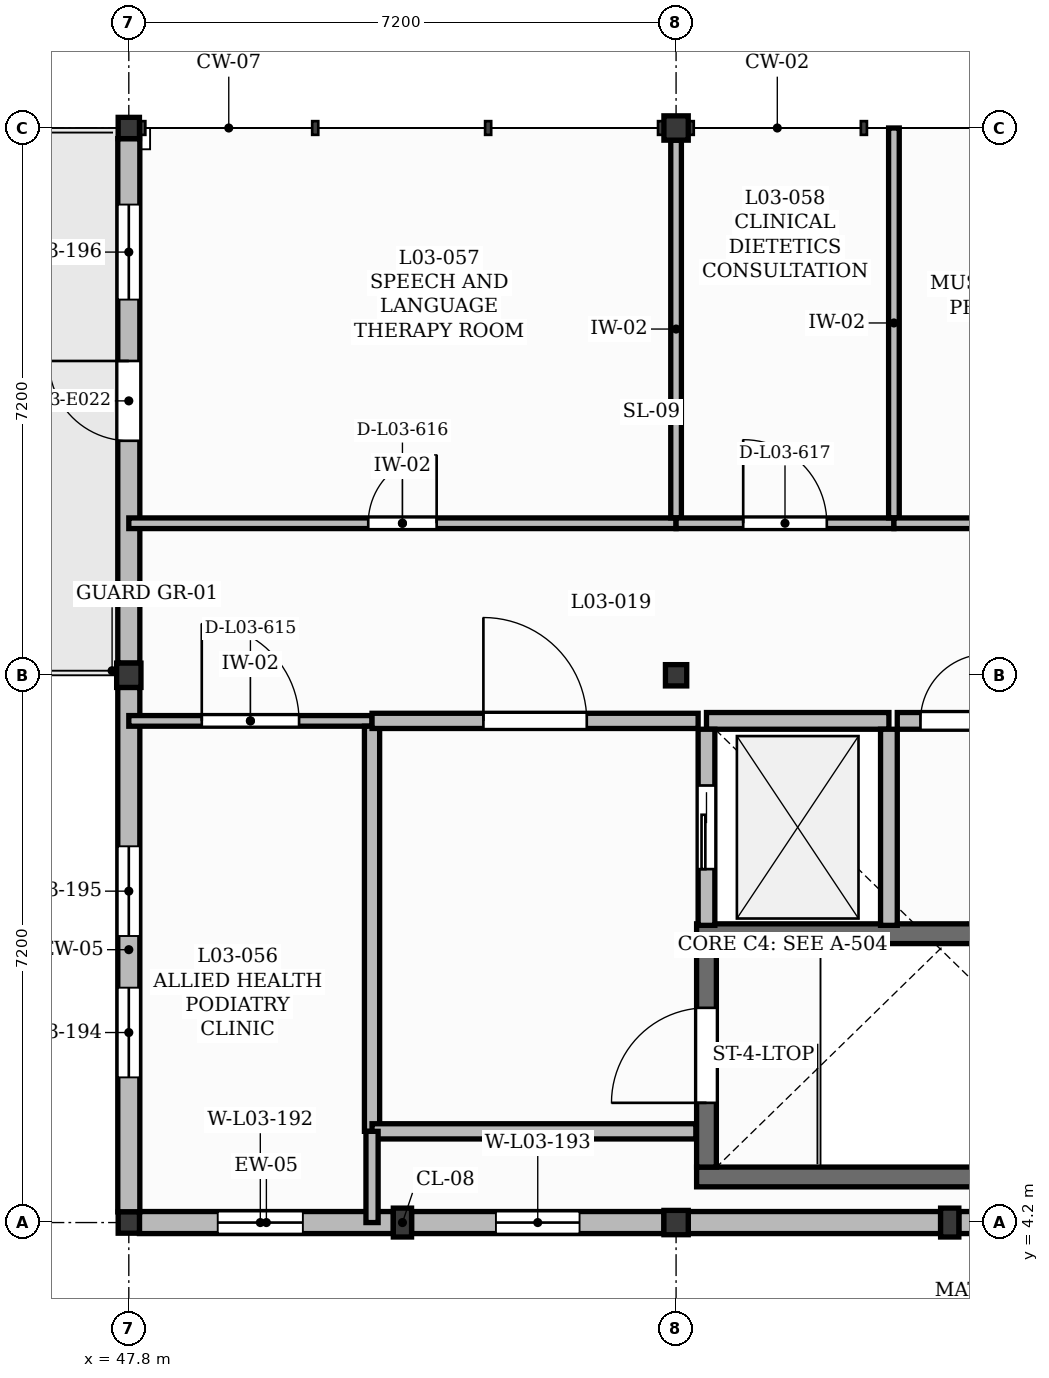
"""IFC4 building model, lengths in metres.
Left out: names, types, materials, properties, quantities, classifications, styles, units other than length and angle.
Written with IfcOpenShell. Run it as: python <this file> out.ifc"""

import sys

from ifc_helpers import new_model, si_unit, direction, frame, frame_2d, origin, origin_2d, place, context, subcontext, project, spatial, rectangle, extrude, element, fill, save


model = new_model("IFC4")
c1 = context("Model", 3, precision=1e-05, world=origin(), true_north=direction((0.0, 1.0)))
c2 = subcontext(c1, "Body", "Model", "MODEL_VIEW")
j1 = project(units=[si_unit("LENGTHUNIT", "METRE"), si_unit("PLANEANGLEUNIT", "RADIAN")], contexts=[c1])
p1 = place(None, origin())
s1 = spatial("IfcSite", under=j1, at=p1, CompositionType="ELEMENT")
p2 = place(p1, origin())
s2 = spatial("IfcBuilding", under=s1, at=p2, CompositionType="ELEMENT")
p3 = place(p2, frame((0.0, 0.0, 13.2)))
s3 = spatial("IfcBuildingStorey", under=s2, at=p3, CompositionType="ELEMENT", Elevation=13.2)
p4 = place(p3, frame((47.8, 4.2, 0.0), z_axis=(0.0, 0.0, 1.0), x_axis=(1.0, 0.0, 0.0)))
e1 = element("IfcColumn", 1, at=p4, inside=s3, PredefinedType="COLUMN", context=c2, shape_type="SweptSolid", body=[
    extrude(rectangle(XDim=0.28, YDim=0.28, at=origin_2d()), origin(), (0.0, 0.0, 1.0), 3.98),
])
p5 = place(p3, frame((47.8, 11.4, 0.0), z_axis=(0.0, 0.0, 1.0), x_axis=(1.0, 0.0, 0.0)))
e2 = element("IfcColumn", 2, at=p5, inside=s3, PredefinedType="COLUMN", context=c2, shape_type="SweptSolid", body=[
    extrude(rectangle(XDim=0.32, YDim=0.32, at=origin_2d()), origin(), (0.0, 0.0, 1.0), 6.045),
])
p6 = place(p3, frame((47.8, 18.6, 0.0), z_axis=(0.0, 0.0, 1.0), x_axis=(1.0, 0.0, 0.0)))
e3 = element("IfcColumn", 3, at=p6, inside=s3, PredefinedType="COLUMN", context=c2, shape_type="SweptSolid", body=[
    extrude(rectangle(XDim=0.28, YDim=0.28, at=origin_2d()), origin(), (0.0, 0.0, 1.0), 8.109),
])
p7 = place(p3, frame((55.0, 4.2, 0.0), z_axis=(0.0, 0.0, 1.0), x_axis=(1.0, 0.0, 0.0)))
e4 = element("IfcColumn", 4, at=p7, inside=s3, PredefinedType="COLUMN", context=c2, shape_type="SweptSolid", body=[
    extrude(rectangle(XDim=0.32, YDim=0.32, at=origin_2d()), origin(), (0.0, 0.0, 1.0), 3.98),
])
p8 = place(p3, frame((55.0, 11.4, 0.0), z_axis=(0.0, 0.0, 1.0), x_axis=(1.0, 0.0, 0.0)))
e5 = element("IfcColumn", 5, at=p8, inside=s3, PredefinedType="COLUMN", context=c2, shape_type="SweptSolid", body=[
    extrude(rectangle(XDim=0.28, YDim=0.28, at=origin_2d()), origin(), (0.0, 0.0, 1.0), 6.045),
])
p9 = place(p3, frame((55.0, 18.6, 0.0), z_axis=(0.0, 0.0, 1.0), x_axis=(1.0, 0.0, 0.0)))
e6 = element("IfcColumn", 6, at=p9, inside=s3, PredefinedType="COLUMN", context=c2, shape_type="SweptSolid", body=[
    extrude(rectangle(XDim=0.32, YDim=0.32, at=origin_2d()), origin(), (0.0, 0.0, 1.0), 8.109),
])
for number, where, z_axis, x_axis in (
    (7, (51.4, 4.2, 0.0), (0.0, 0.0, 1.0), (1.0, 0.0, 0.0)),
    (8, (58.6, 4.2, 0.0), (0.0, 0.0, 1.0), (1.0, 0.0, 0.0)),
):
    element("IfcColumn", number, at=place(p3, frame(where, z_axis=z_axis, x_axis=x_axis)), inside=s3, PredefinedType="PILASTER", context=c2, shape_type="SweptSolid", body=[
        extrude(rectangle(XDim=0.24, YDim=0.38, at=origin_2d()), origin(), (0.0, 0.0, 1.0), 4.0),
    ])
p10 = place(p3, frame((47.94, 4.2, 0.0), z_axis=(0.0, 0.0, 1.0), x_axis=(1.0, 0.0, 0.0)))
e9 = element("IfcWall", 9, at=p10, inside=s3, PredefinedType="SOLIDWALL", context=c2, shape_type="SweptSolid", body=[
    extrude(rectangle(XDim=3.34, YDim=0.29, at=frame_2d((1.67, 0.0))), origin(), (0.0, 0.0, 1.0), 4.0),
])
p11 = place(p10, frame((1.03, 0.0, 1.05)))
e10 = element("IfcOpeningElement", 10, at=p11, cuts=e9, PredefinedType="OPENING", context=c2, shape_type="SweptSolid", body=[
    extrude(rectangle(XDim=1.12, YDim=1.65, at=frame_2d((0.56, 0.825))), frame((0.0, 0.155, 0.0), z_axis=(0.0, -1.0, 0.0), x_axis=(1.0, 0.0, 0.0)), (0.0, 0.0, 1.0), 0.31),
])
p12 = place(p3, frame((51.52, 4.2, 0.0), z_axis=(0.0, 0.0, 1.0), x_axis=(1.0, 0.0, 0.0)))
e11 = element("IfcWall", 11, at=p12, inside=s3, PredefinedType="SOLIDWALL", context=c2, shape_type="SweptSolid", body=[
    extrude(rectangle(XDim=3.32, YDim=0.29, at=frame_2d((1.66, 0.0))), origin(), (0.0, 0.0, 1.0), 4.0),
])
p13 = place(p12, frame((1.11, 0.0, 1.0)))
e12 = element("IfcOpeningElement", 12, at=p13, cuts=e11, PredefinedType="OPENING", context=c2, shape_type="SweptSolid", body=[
    extrude(rectangle(XDim=1.1, YDim=2.2, at=frame_2d((0.55, 1.1))), frame((0.0, 0.155, 0.0), z_axis=(0.0, -1.0, 0.0), x_axis=(1.0, 0.0, 0.0)), (0.0, 0.0, 1.0), 0.31),
])
p14 = place(p3, frame((47.8, 4.34, 0.0), z_axis=(0.0, 0.0, 1.0), x_axis=(0.0, 1.0, 0.0)))
e13 = element("IfcWall", 13, at=p14, inside=s3, PredefinedType="SOLIDWALL", context=c2, shape_type="SweptSolid", body=[
    extrude(rectangle(XDim=6.9, YDim=0.29, at=frame_2d((3.45, 0.0))), origin(), (0.0, 0.0, 1.0), 4.0),
])
p15 = place(p14, frame((1.77, 0.0, 0.9)))
e14 = element("IfcOpeningElement", 14, at=p15, cuts=e13, PredefinedType="OPENING", context=c2, shape_type="SweptSolid", body=[
    extrude(rectangle(XDim=1.18, YDim=2.4, at=frame_2d((0.59, 1.2))), frame((0.0, 0.155, 0.0), z_axis=(0.0, -1.0, 0.0), x_axis=(1.0, 0.0, 0.0)), (0.0, 0.0, 1.0), 0.31),
])
p16 = place(p14, frame((3.63, 0.0, 0.9)))
e15 = element("IfcOpeningElement", 15, at=p16, cuts=e13, PredefinedType="OPENING", context=c2, shape_type="SweptSolid", body=[
    extrude(rectangle(XDim=1.18, YDim=2.4, at=frame_2d((0.59, 1.2))), frame((0.0, 0.155, 0.0), z_axis=(0.0, -1.0, 0.0), x_axis=(1.0, 0.0, 0.0)), (0.0, 0.0, 1.0), 0.31),
])
p17 = place(p3, frame((47.8, 11.56, 0.0), z_axis=(0.0, 0.0, 1.0), x_axis=(0.0, 1.0, 0.0)))
e16 = element("IfcWall", 16, at=p17, inside=s3, PredefinedType="SOLIDWALL", context=c2, shape_type="SweptSolid", body=[
    extrude(rectangle(XDim=6.9, YDim=0.29, at=frame_2d((3.45, 0.0))), origin(), (0.0, 0.0, 1.0), 4.0),
])
p18 = place(p17, frame((2.925, 0.0, 0.0)))
e17 = element("IfcOpeningElement", 17, at=p18, cuts=e16, PredefinedType="OPENING", context=c2, shape_type="SweptSolid", body=[
    extrude(rectangle(XDim=1.05, YDim=2.2, at=frame_2d((0.525, 1.1))), frame((0.0, 0.155, 0.0), z_axis=(0.0, -1.0, 0.0), x_axis=(1.0, 0.0, 0.0)), (0.0, 0.0, 1.0), 0.31),
])
p19 = place(p17, frame((4.782, 0.0, 1.35)))
e18 = element("IfcOpeningElement", 18, at=p19, cuts=e16, PredefinedType="OPENING", context=c2, shape_type="SweptSolid", body=[
    extrude(rectangle(XDim=1.25, YDim=1.4, at=frame_2d((0.625, 0.7))), frame((0.0, 0.155, 0.0), z_axis=(0.0, -1.0, 0.0), x_axis=(1.0, 0.0, 0.0)), (0.0, 0.0, 1.0), 0.31),
])
p20 = place(p3, frame((55.16, 4.2, 0.0), z_axis=(0.0, 0.0, 1.0), x_axis=(1.0, 0.0, 0.0)))
e19 = element("IfcWall", 19, at=p20, inside=s3, PredefinedType="SOLIDWALL", context=c2, shape_type="SweptSolid", body=[
    extrude(rectangle(XDim=3.32, YDim=0.29, at=frame_2d((1.66, 0.0))), origin(), (0.0, 0.0, 1.0), 4.0),
])
p21 = place(p3, frame((58.72, 4.2, 0.0), z_axis=(0.0, 0.0, 1.0), x_axis=(1.0, 0.0, 0.0)))
e20 = element("IfcWall", 20, at=p21, inside=s3, PredefinedType="SOLIDWALL", context=c2, shape_type="SweptSolid", body=[
    extrude(rectangle(XDim=3.34, YDim=0.29, at=frame_2d((1.67, 0.0))), origin(), (0.0, 0.0, 1.0), 4.0),
])
for number, where, z_axis, x_axis in (
    (21, (55.27, 4.8, 0.0), (0.0, 0.0, 1.0), (1.0, 0.0, 0.0)),
    (22, (55.27, 8.0, 0.0), (0.0, 0.0, 1.0), (1.0, 0.0, 0.0)),
):
    element("IfcWall", number, at=place(p3, frame(where, z_axis=z_axis, x_axis=x_axis)), inside=s3, PredefinedType="SHEAR", context=c2, shape_type="SweptSolid", body=[
        extrude(rectangle(XDim=6.66, YDim=0.26, at=frame_2d((3.33, 0.0))), origin(), (0.0, 0.0, 1.0), 3.95),
    ])
p22 = place(p3, frame((55.4, 4.93, 0.0), z_axis=(0.0, 0.0, 1.0), x_axis=(0.0, 1.0, 0.0)))
e23 = element("IfcWall", 23, at=p22, inside=s3, PredefinedType="SHEAR", context=c2, shape_type="SweptSolid", body=[
    extrude(rectangle(XDim=2.94, YDim=0.26, at=frame_2d((1.47, 0.0))), origin(), (0.0, 0.0, 1.0), 3.95),
])
p23 = place(p22, frame((0.845, 0.0, 0.0)))
e24 = element("IfcOpeningElement", 24, at=p23, cuts=e23, PredefinedType="OPENING", context=c2, shape_type="SweptSolid", body=[
    extrude(rectangle(XDim=1.25, YDim=2.15, at=frame_2d((0.625, 1.075))), frame((0.0, 0.14, 0.0), z_axis=(0.0, -1.0, 0.0), x_axis=(1.0, 0.0, 0.0)), (0.0, 0.0, 1.0), 0.28),
])
p24 = place(p3, frame((55.4, 10.8, 0.0), z_axis=(0.0, 0.0, 1.0), x_axis=(1.0, 0.0, 0.0)))
e25 = element("IfcWall", 25, at=p24, inside=s3, PredefinedType="SOLIDWALL", context=c2, shape_type="SweptSolid", body=[
    extrude(rectangle(XDim=2.4, YDim=0.22, at=frame_2d((1.2, 0.0))), origin(), (0.0, 0.0, 1.0), 3.95),
])
p25 = place(p3, frame((55.4, 8.11, 0.0), z_axis=(0.0, 0.0, 1.0), x_axis=(0.0, 1.0, 0.0)))
e26 = element("IfcWall", 26, at=p25, inside=s3, PredefinedType="SOLIDWALL", context=c2, shape_type="SweptSolid", body=[
    extrude(rectangle(XDim=2.58, YDim=0.22, at=frame_2d((1.29, 0.0))), origin(), (0.0, 0.0, 1.0), 3.95),
])
p26 = place(p25, frame((0.74, 0.0, 0.0)))
e27 = element("IfcOpeningElement", 27, at=p26, cuts=e26, PredefinedType="OPENING", context=c2, shape_type="SweptSolid", body=[
    extrude(rectangle(XDim=1.1, YDim=2.15, at=frame_2d((0.55, 1.075))), frame((0.0, 0.12, 0.0), z_axis=(0.0, -1.0, 0.0), x_axis=(1.0, 0.0, 0.0)), (0.0, 0.0, 1.0), 0.24),
])
p27 = place(p3, frame((57.8, 8.11, 0.0), z_axis=(0.0, 0.0, 1.0), x_axis=(0.0, 1.0, 0.0)))
e28 = element("IfcWall", 28, at=p27, inside=s3, PredefinedType="SOLIDWALL", context=c2, shape_type="SweptSolid", body=[
    extrude(rectangle(XDim=2.58, YDim=0.22, at=frame_2d((1.29, 0.0))), origin(), (0.0, 0.0, 1.0), 3.95),
])
p28 = place(p3, frame((47.8, 10.8, 0.0), z_axis=(0.0, 0.0, 1.0), x_axis=(1.0, 0.0, 0.0)))
e29 = element("IfcWall", 29, at=p28, inside=s3, PredefinedType="PARTITIONING", context=c2, shape_type="SweptSolid", body=[
    extrude(rectangle(XDim=3.2, YDim=0.14, at=frame_2d((1.6, 0.0))), origin(), (0.0, 0.0, 1.0), 3.75),
])
p29 = place(p28, frame((0.96, 0.0, 0.0)))
e30 = element("IfcOpeningElement", 30, at=p29, cuts=e29, PredefinedType="OPENING", context=c2, shape_type="SweptSolid", body=[
    extrude(rectangle(XDim=1.28, YDim=2.2, at=frame_2d((0.64, 1.1))), frame((0.0, 0.08, 0.0), z_axis=(0.0, -1.0, 0.0), x_axis=(1.0, 0.0, 0.0)), (0.0, 0.0, 1.0), 0.16),
])
p30 = place(p3, frame((47.8, 13.4, 0.0), z_axis=(0.0, 0.0, 1.0), x_axis=(1.0, 0.0, 0.0)))
e31 = element("IfcWall", 31, at=p30, inside=s3, PredefinedType="PARTITIONING", context=c2, shape_type="SweptSolid", body=[
    extrude(rectangle(XDim=7.2, YDim=0.14, at=frame_2d((3.6, 0.0))), origin(), (0.0, 0.0, 1.0), 3.75),
])
p31 = place(p30, frame((3.15, 0.0, 0.0)))
e32 = element("IfcOpeningElement", 32, at=p31, cuts=e31, PredefinedType="OPENING", context=c2, shape_type="SweptSolid", body=[
    extrude(rectangle(XDim=0.9, YDim=2.1, at=frame_2d((0.45, 1.05))), frame((0.0, 0.08, 0.0), z_axis=(0.0, -1.0, 0.0), x_axis=(1.0, 0.0, 0.0)), (0.0, 0.0, 1.0), 0.16),
])
p32 = place(p3, frame((51.0, 5.4, 0.0), z_axis=(0.0, 0.0, 1.0), x_axis=(0.0, 1.0, 0.0)))
e33 = element("IfcWall", 33, at=p32, inside=s3, PredefinedType="PARTITIONING", context=c2, shape_type="SweptSolid", body=[
    extrude(rectangle(XDim=5.33, YDim=0.2, at=frame_2d((2.665, 0.0))), origin(), (0.0, 0.0, 1.0), 3.75),
])
p33 = place(p3, frame((51.0, 10.8, 0.0), z_axis=(0.0, 0.0, 1.0), x_axis=(1.0, 0.0, 0.0)))
e34 = element("IfcWall", 34, at=p33, inside=s3, PredefinedType="PARTITIONING", context=c2, shape_type="SweptSolid", body=[
    extrude(rectangle(XDim=4.29, YDim=0.2, at=frame_2d((2.145, 0.0))), origin(), (0.0, 0.0, 1.0), 3.75),
])
p34 = place(p33, frame((1.465, 0.0, 0.0)))
e35 = element("IfcOpeningElement", 35, at=p34, cuts=e34, PredefinedType="OPENING", context=c2, shape_type="SweptSolid", body=[
    extrude(rectangle(XDim=1.36, YDim=2.2, at=frame_2d((0.68, 1.1))), frame((0.0, 0.11, 0.0), z_axis=(0.0, -1.0, 0.0), x_axis=(1.0, 0.0, 0.0)), (0.0, 0.0, 1.0), 0.22),
])
p35 = place(p3, frame((55.0, 13.47, 0.0), z_axis=(0.0, 0.0, 1.0), x_axis=(0.0, 1.0, 0.0)))
e36 = element("IfcWall", 36, at=p35, inside=s3, PredefinedType="PARTITIONING", context=c2, shape_type="SweptSolid", body=[
    extrude(rectangle(XDim=4.97, YDim=0.14, at=frame_2d((2.485, 0.0))), origin(), (0.0, 0.0, 1.0), 3.75),
])
p36 = place(p3, frame((55.0, 13.4, 0.0), z_axis=(0.0, 0.0, 1.0), x_axis=(1.0, 0.0, 0.0)))
e37 = element("IfcWall", 37, at=p36, inside=s3, PredefinedType="PARTITIONING", context=c2, shape_type="SweptSolid", body=[
    extrude(rectangle(XDim=2.866, YDim=0.14, at=frame_2d((1.433, 0.0))), origin(), (0.0, 0.0, 1.0), 3.75),
])
p37 = place(p36, frame((0.883, 0.0, 0.0)))
e38 = element("IfcOpeningElement", 38, at=p37, cuts=e37, PredefinedType="OPENING", context=c2, shape_type="SweptSolid", body=[
    extrude(rectangle(XDim=1.1, YDim=2.1, at=frame_2d((0.55, 1.05))), frame((0.0, 0.08, 0.0), z_axis=(0.0, -1.0, 0.0), x_axis=(1.0, 0.0, 0.0)), (0.0, 0.0, 1.0), 0.16),
])
p38 = place(p3, frame((57.91, 10.8, 0.0), z_axis=(0.0, 0.0, 1.0), x_axis=(1.0, 0.0, 0.0)))
e39 = element("IfcWall", 39, at=p38, inside=s3, PredefinedType="SOLIDWALL", context=c2, shape_type="SweptSolid", body=[
    extrude(rectangle(XDim=1.49, YDim=0.22, at=frame_2d((0.745, 0.0))), origin(), (0.0, 0.0, 1.0), 3.75),
])
p39 = place(p38, frame((0.305, 0.0, 0.0)))
e40 = element("IfcOpeningElement", 40, at=p39, cuts=e39, PredefinedType="OPENING", context=c2, shape_type="SweptSolid", body=[
    extrude(rectangle(XDim=0.88, YDim=2.05, at=frame_2d((0.44, 1.025))), frame((0.0, 0.12, 0.0), z_axis=(0.0, -1.0, 0.0), x_axis=(1.0, 0.0, 0.0)), (0.0, 0.0, 1.0), 0.24),
])
p40 = place(p3, frame((57.866, 13.47, 0.0), z_axis=(0.0, 0.0, 1.0), x_axis=(0.0, 1.0, 0.0)))
e41 = element("IfcWall", 41, at=p40, inside=s3, PredefinedType="PARTITIONING", context=c2, shape_type="SweptSolid", body=[
    extrude(rectangle(XDim=5.13, YDim=0.14, at=frame_2d((2.565, 0.0))), origin(), (0.0, 0.0, 1.0), 3.75),
])
p41 = place(p3, frame((57.866, 13.4, 0.0), z_axis=(0.0, 0.0, 1.0), x_axis=(1.0, 0.0, 0.0)))
e42 = element("IfcWall", 42, at=p41, inside=s3, PredefinedType="PARTITIONING", context=c2, shape_type="SweptSolid", body=[
    extrude(rectangle(XDim=4.334, YDim=0.14, at=frame_2d((2.167, 0.0))), origin(), (0.0, 0.0, 1.0), 3.75),
])
p42 = place(p41, frame((1.677, 0.0, 0.0)))
e43 = element("IfcOpeningElement", 43, at=p42, cuts=e42, PredefinedType="OPENING", context=c2, shape_type="SweptSolid", body=[
    extrude(rectangle(XDim=0.98, YDim=2.15, at=frame_2d((0.49, 1.075))), frame((0.0, 0.08, 0.0), z_axis=(0.0, -1.0, 0.0), x_axis=(1.0, 0.0, 0.0)), (0.0, 0.0, 1.0), 0.16),
])
p43 = place(p3, frame((51.0, 5.4, 0.0), z_axis=(0.0, 0.0, 1.0), x_axis=(1.0, 0.0, 0.0)))
e44 = element("IfcWall", 44, at=p43, inside=s3, PredefinedType="PARTITIONING", context=c2, shape_type="SweptSolid", body=[
    extrude(rectangle(XDim=4.26, YDim=0.2, at=frame_2d((2.13, 0.0))), origin(), (0.0, 0.0, 1.0), 3.75),
])
p44 = place(p3, frame((51.0, 4.2, 0.0), z_axis=(0.0, 0.0, 1.0), x_axis=(0.0, 1.0, 0.0)))
e45 = element("IfcWall", 45, at=p44, inside=s3, PredefinedType="PARTITIONING", context=c2, shape_type="SweptSolid", body=[
    extrude(rectangle(XDim=1.2, YDim=0.16, at=frame_2d((0.6, 0.0))), origin(), (0.0, 0.0, 1.0), 3.75),
])
p45 = place(p11, origin())
e46 = element("IfcWindow", 46, at=p45, inside=s3, PartitioningType="SINGLE_PANEL", PredefinedType="WINDOW", context=c2, shape_type="SweptSolid", body=[
    extrude(rectangle(XDim=1.12, YDim=1.65, at=frame_2d((0.56, 0.825))), frame((0.0, 0.03, 0.0), z_axis=(0.0, -1.0, 0.0), x_axis=(1.0, 0.0, 0.0)), (0.0, 0.0, 1.0), 0.06),
])
fill(e10, e46)
p46 = place(p13, origin())
e47 = element("IfcWindow", 47, at=p46, inside=s3, PartitioningType="SINGLE_PANEL", PredefinedType="WINDOW", context=c2, shape_type="SweptSolid", body=[
    extrude(rectangle(XDim=1.1, YDim=2.2, at=frame_2d((0.55, 1.1))), frame((0.0, 0.03, 0.0), z_axis=(0.0, -1.0, 0.0), x_axis=(1.0, 0.0, 0.0)), (0.0, 0.0, 1.0), 0.06),
])
fill(e12, e47)
p47 = place(p15, origin())
e48 = element("IfcWindow", 48, at=p47, inside=s3, PartitioningType="SINGLE_PANEL", PredefinedType="WINDOW", context=c2, shape_type="SweptSolid", body=[
    extrude(rectangle(XDim=1.18, YDim=2.4, at=frame_2d((0.59, 1.2))), frame((0.0, 0.03, 0.0), z_axis=(0.0, -1.0, 0.0), x_axis=(1.0, 0.0, 0.0)), (0.0, 0.0, 1.0), 0.06),
])
fill(e14, e48)
p48 = place(p16, origin())
e49 = element("IfcWindow", 49, at=p48, inside=s3, PartitioningType="SINGLE_PANEL", PredefinedType="WINDOW", context=c2, shape_type="SweptSolid", body=[
    extrude(rectangle(XDim=1.18, YDim=2.4, at=frame_2d((0.59, 1.2))), frame((0.0, 0.03, 0.0), z_axis=(0.0, -1.0, 0.0), x_axis=(1.0, 0.0, 0.0)), (0.0, 0.0, 1.0), 0.06),
])
fill(e15, e49)
p49 = place(p18, origin())
e50 = element("IfcDoor", 50, at=p49, inside=s3, OperationType="SINGLE_SWING_RIGHT", PredefinedType="DOOR", context=c2, shape_type="SweptSolid", body=[
    extrude(rectangle(XDim=1.05, YDim=2.2, at=frame_2d((0.525, 1.1))), frame((0.0, 0.025, 0.0), z_axis=(0.0, -1.0, 0.0), x_axis=(1.0, 0.0, 0.0)), (0.0, 0.0, 1.0), 0.05),
])
fill(e17, e50)
p50 = place(p19, origin())
e51 = element("IfcWindow", 51, at=p50, inside=s3, PartitioningType="SINGLE_PANEL", PredefinedType="WINDOW", context=c2, shape_type="SweptSolid", body=[
    extrude(rectangle(XDim=1.25, YDim=1.4, at=frame_2d((0.625, 0.7))), frame((0.0, 0.03, 0.0), z_axis=(0.0, -1.0, 0.0), x_axis=(1.0, 0.0, 0.0)), (0.0, 0.0, 1.0), 0.06),
])
fill(e18, e51)
p51 = place(p26, origin())
e52 = element("IfcDoor", 52, at=p51, inside=s3, OperationType="SLIDING_TO_LEFT", PredefinedType="DOOR", context=c2, shape_type="SweptSolid", body=[
    extrude(rectangle(XDim=1.1, YDim=2.15, at=frame_2d((0.55, 1.075))), frame((0.0, 0.025, 0.0), z_axis=(0.0, -1.0, 0.0), x_axis=(1.0, 0.0, 0.0)), (0.0, 0.0, 1.0), 0.05),
])
fill(e27, e52)
p52 = place(p23, origin())
e53 = element("IfcDoor", 53, at=p52, inside=s3, OperationType="SINGLE_SWING_LEFT", PredefinedType="DOOR", context=c2, shape_type="SweptSolid", body=[
    extrude(rectangle(XDim=1.25, YDim=2.15, at=frame_2d((0.625, 1.075))), frame((0.0, 0.025, 0.0), z_axis=(0.0, -1.0, 0.0), x_axis=(1.0, 0.0, 0.0)), (0.0, 0.0, 1.0), 0.05),
])
fill(e24, e53)
p53 = place(p34, origin())
e54 = element("IfcDoor", 54, at=p53, inside=s3, OperationType="SINGLE_SWING_LEFT", PredefinedType="DOOR", context=c2, shape_type="SweptSolid", body=[
    extrude(rectangle(XDim=1.36, YDim=2.2, at=frame_2d((0.68, 1.1))), frame((0.0, 0.025, 0.0), z_axis=(0.0, -1.0, 0.0), x_axis=(1.0, 0.0, 0.0)), (0.0, 0.0, 1.0), 0.05),
])
fill(e35, e54)
p54 = place(p39, origin())
e55 = element("IfcDoor", 55, at=p54, inside=s3, OperationType="SINGLE_SWING_RIGHT", PredefinedType="DOOR", context=c2, shape_type="SweptSolid", body=[
    extrude(rectangle(XDim=0.88, YDim=2.05, at=frame_2d((0.44, 1.025))), frame((0.0, 0.025, 0.0), z_axis=(0.0, -1.0, 0.0), x_axis=(1.0, 0.0, 0.0)), (0.0, 0.0, 1.0), 0.05),
])
fill(e40, e55)
p55 = place(p29, origin())
e56 = element("IfcDoor", 56, at=p55, inside=s3, OperationType="SINGLE_SWING_LEFT", PredefinedType="DOOR", context=c2, shape_type="SweptSolid", body=[
    extrude(rectangle(XDim=1.28, YDim=2.2, at=frame_2d((0.64, 1.1))), frame((0.0, 0.025, 0.0), z_axis=(0.0, -1.0, 0.0), x_axis=(1.0, 0.0, 0.0)), (0.0, 0.0, 1.0), 0.05),
])
fill(e30, e56)
p56 = place(p31, origin())
e57 = element("IfcDoor", 57, at=p56, inside=s3, OperationType="SINGLE_SWING_RIGHT", PredefinedType="DOOR", context=c2, shape_type="SweptSolid", body=[
    extrude(rectangle(XDim=0.9, YDim=2.1, at=frame_2d((0.45, 1.05))), frame((0.0, 0.025, 0.0), z_axis=(0.0, -1.0, 0.0), x_axis=(1.0, 0.0, 0.0)), (0.0, 0.0, 1.0), 0.05),
])
fill(e32, e57)
p57 = place(p37, origin())
e58 = element("IfcDoor", 58, at=p57, inside=s3, OperationType="SINGLE_SWING_LEFT", PredefinedType="DOOR", context=c2, shape_type="SweptSolid", body=[
    extrude(rectangle(XDim=1.1, YDim=2.1, at=frame_2d((0.55, 1.05))), frame((0.0, 0.025, 0.0), z_axis=(0.0, -1.0, 0.0), x_axis=(1.0, 0.0, 0.0)), (0.0, 0.0, 1.0), 0.05),
])
fill(e38, e58)
save(model, sys.argv[1])
